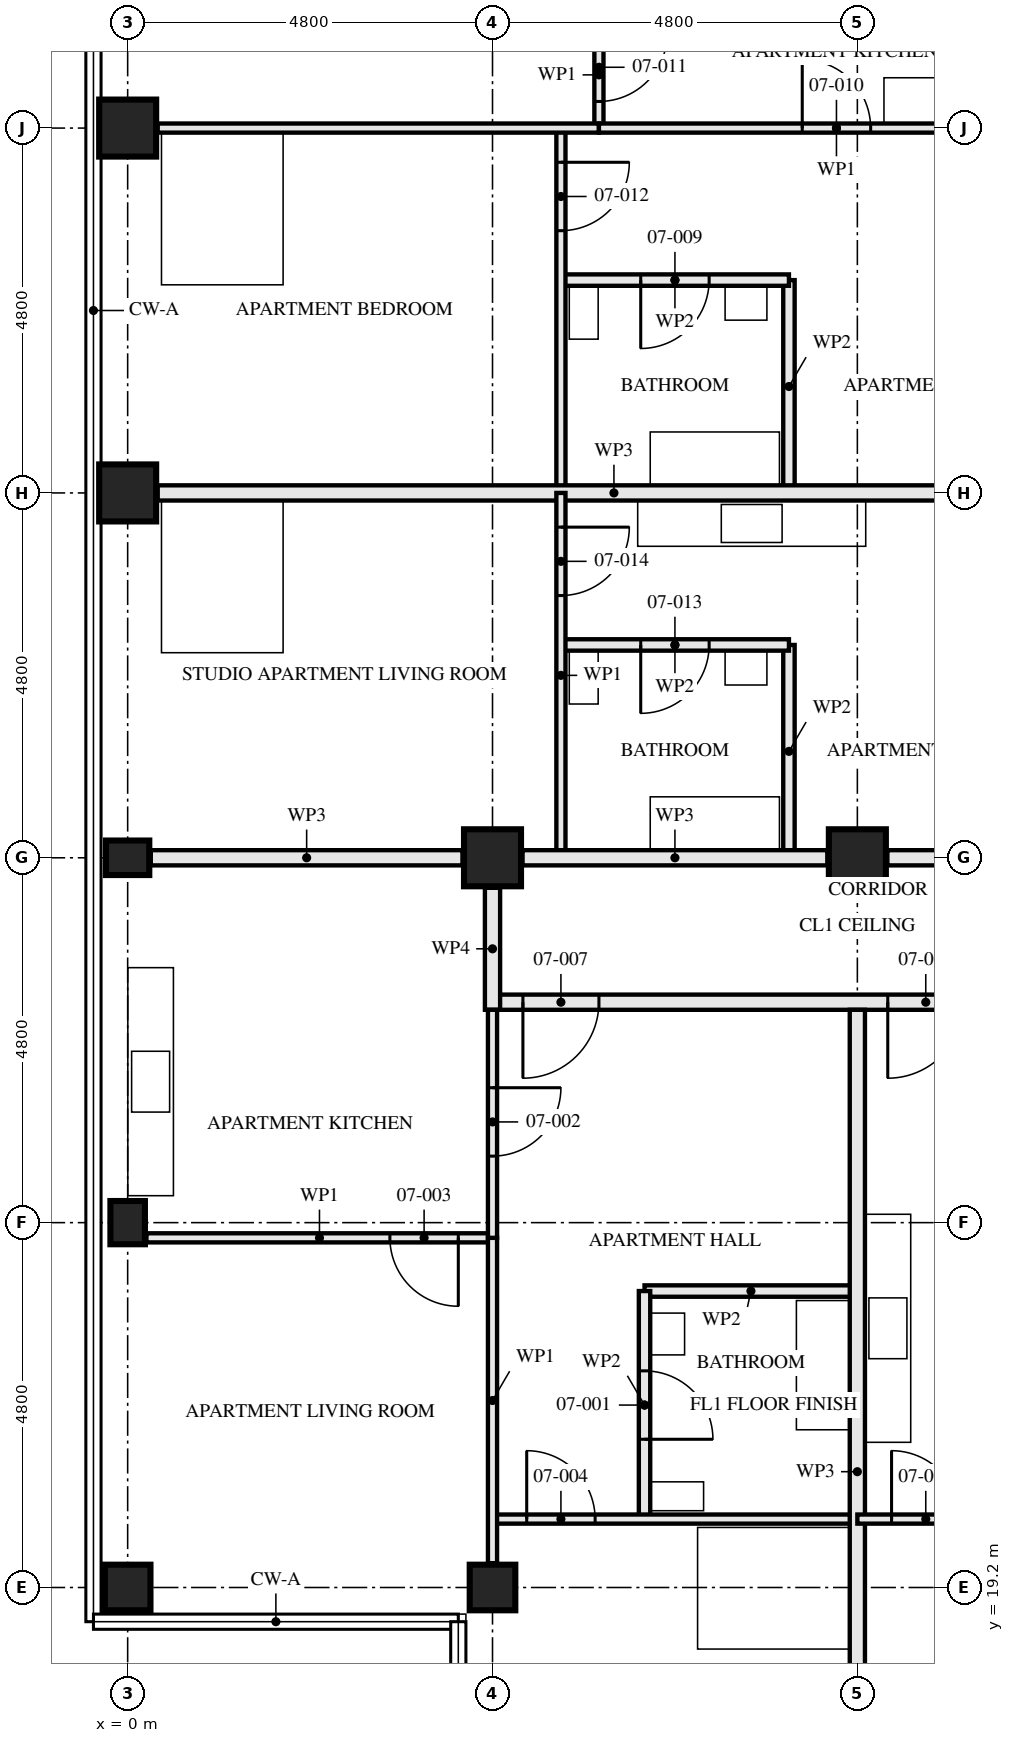
"""IFC4 building model, lengths in metres.
Left out: names, types, materials, properties, quantities, classifications, styles, units other than length and angle.
Written with IfcOpenShell. Run it as: python <this file> out.ifc"""

import sys

from ifc_helpers import new_model, si_unit, direction, frame, frame_2d, origin, origin_2d, place, context, subcontext, project, spatial, rectangle, hollow_rectangle, i_section, extrude, element, fill, save


model = new_model("IFC4")
c1 = context("Model", 3, precision=1e-05, world=origin(), true_north=direction((0.0, 1.0)))
c2 = subcontext(c1, "Body", "Model", "MODEL_VIEW")
j1 = project(units=[si_unit("LENGTHUNIT", "METRE"), si_unit("PLANEANGLEUNIT", "RADIAN")], contexts=[c1])
p1 = place(None, origin())
s1 = spatial("IfcSite", under=j1, at=p1, CompositionType="ELEMENT")
p2 = place(p1, origin())
s2 = spatial("IfcBuilding", under=s1, at=p2, CompositionType="ELEMENT")
p3 = place(p2, frame((0.0, 0.0, 30.5)))
s3 = spatial("IfcBuildingStorey", under=s2, at=p3, CompositionType="ELEMENT", Elevation=30.5)
p4 = place(p3, frame((0.0, 19.2, 0.0), z_axis=(0.0, 0.0, 1.0), x_axis=(0.0, 1.0, 0.0)))
e1 = element("IfcColumn", 1, at=p4, inside=s3, PredefinedType="COLUMN", context=c2, shape_type="SweptSolid", body=[
    extrude(hollow_rectangle(XDim=0.6, YDim=0.6, WallThickness=0.05, at=origin_2d()), origin(), (0.0, 0.0, 1.0), 3.5),
])
for number, where, z_axis, x_axis in (
    (2, (0.0, 24.0, 0.0), (0.0, 0.0, 1.0), (1.0, 0.0, 0.0)),
    (3, (0.0, 28.8, 0.0), (0.0, 0.0, 1.0), (0.0, 1.0, 0.0)),
):
    element("IfcColumn", number, at=place(p3, frame(where, z_axis=z_axis, x_axis=x_axis)), inside=s3, PredefinedType="COLUMN", context=c2, shape_type="SweptSolid", body=[
        extrude(i_section(OverallWidth=0.454, OverallDepth=0.569, WebThickness=0.078, FlangeThickness=0.125, FilletRadius=0.015, at=origin_2d()), origin(), (0.0, 0.0, 1.0), 3.5),
    ])
for number, where, z_axis, x_axis in (
    (4, (0.0, 33.6, 0.0), (0.0, 0.0, 1.0), (1.0, 0.0, 0.0)),
    (5, (0.0, 38.4, 0.0), (0.0, 0.0, 1.0), (1.0, 0.0, 0.0)),
):
    element("IfcColumn", number, at=place(p3, frame(where, z_axis=z_axis, x_axis=x_axis)), inside=s3, PredefinedType="COLUMN", context=c2, shape_type="SweptSolid", body=[
        extrude(hollow_rectangle(XDim=0.75, YDim=0.75, WallThickness=0.08, at=origin_2d()), origin(), (0.0, 0.0, 1.0), 3.5),
    ])
p5 = place(p3, frame((4.8, 19.2, 0.0), z_axis=(0.0, 0.0, 1.0), x_axis=(0.0, 1.0, 0.0)))
e6 = element("IfcColumn", 6, at=p5, inside=s3, PredefinedType="COLUMN", context=c2, shape_type="SweptSolid", body=[
    extrude(hollow_rectangle(XDim=0.6, YDim=0.6, WallThickness=0.05, at=origin_2d()), origin(), (0.0, 0.0, 1.0), 3.5),
])
for number, where, z_axis, x_axis in (
    (7, (4.8, 28.8, 0.0), (0.0, 0.0, 1.0), (0.0, 1.0, 0.0)),
    (8, (9.6, 28.8, 0.0), (0.0, 0.0, 1.0), (0.0, 1.0, 0.0)),
):
    element("IfcColumn", number, at=place(p3, frame(where, z_axis=z_axis, x_axis=x_axis)), inside=s3, PredefinedType="COLUMN", context=c2, shape_type="SweptSolid", body=[
        extrude(hollow_rectangle(XDim=0.75, YDim=0.75, WallThickness=0.08, at=origin_2d()), origin(), (0.0, 0.0, 1.0), 3.5),
    ])
p6 = place(p3, frame((6.8, 20.1, 0.0), z_axis=(0.0, 0.0, 1.0), x_axis=(0.0, 1.0, 0.0)))
e9 = element("IfcWall", 9, at=p6, inside=s3, PredefinedType="PARTITIONING", context=c2, shape_type="SweptSolid", body=[
    extrude(rectangle(XDim=3.0, YDim=0.15, at=frame_2d((1.5, 0.0))), origin(), (0.0, 0.0, 1.0), 3.33),
])
p7 = place(p6, frame((1.05, 0.0, 0.0)))
e10 = element("IfcOpeningElement", 10, at=p7, cuts=e9, PredefinedType="OPENING", context=c2, shape_type="SweptSolid", body=[
    extrude(rectangle(XDim=0.9, YDim=2.1, at=frame_2d((0.45, 1.05))), frame((0.0, 0.085, 0.0), z_axis=(0.0, -1.0, 0.0), x_axis=(1.0, 0.0, 0.0)), (0.0, 0.0, 1.0), 0.171),
])
p8 = place(p3, frame((6.8, 23.1, 0.0), z_axis=(0.0, 0.0, 1.0), x_axis=(1.0, 0.0, 0.0)))
e11 = element("IfcWall", 11, at=p8, inside=s3, PredefinedType="PARTITIONING", context=c2, shape_type="SweptSolid", body=[
    extrude(rectangle(XDim=2.8, YDim=0.15, at=frame_2d((1.4, 0.0))), origin(), (0.0, 0.0, 1.0), 3.33),
])
p9 = place(p3, frame((4.8, 23.8, 0.0), z_axis=(0.0, 0.0, 1.0), x_axis=(0.0, 1.0, 0.0)))
e12 = element("IfcWall", 12, at=p9, inside=s3, PredefinedType="PARTITIONING", context=c2, shape_type="SweptSolid", body=[
    extrude(rectangle(XDim=3.0, YDim=0.12, at=frame_2d((1.5, 0.0))), origin(), (0.0, 0.0, 1.0), 2.55),
])
p10 = place(p9, frame((1.075, 0.0, 0.0)))
e13 = element("IfcOpeningElement", 13, at=p10, cuts=e12, PredefinedType="OPENING", context=c2, shape_type="SweptSolid", body=[
    extrude(rectangle(XDim=0.9, YDim=2.1, at=frame_2d((0.45, 1.05))), frame((0.0, 0.071, 0.0), z_axis=(0.0, -1.0, 0.0), x_axis=(1.0, 0.0, 0.0)), (0.0, 0.0, 1.0), 0.141),
])
p11 = place(p3, frame((0.247, 23.8, 0.0), z_axis=(0.0, 0.0, 1.0), x_axis=(1.0, 0.0, 0.0)))
e14 = element("IfcWall", 14, at=p11, inside=s3, PredefinedType="PARTITIONING", context=c2, shape_type="SweptSolid", body=[
    extrude(rectangle(XDim=4.553, YDim=0.12, at=frame_2d((2.276, 0.0))), origin(), (0.0, 0.0, 1.0), 3.33),
])
p12 = place(p11, frame((3.203, 0.0, 0.0)))
e15 = element("IfcOpeningElement", 15, at=p12, cuts=e14, PredefinedType="OPENING", context=c2, shape_type="SweptSolid", body=[
    extrude(rectangle(XDim=0.9, YDim=2.1, at=frame_2d((0.45, 1.05))), frame((0.0, 0.071, 0.0), z_axis=(0.0, -1.0, 0.0), x_axis=(1.0, 0.0, 0.0)), (0.0, 0.0, 1.0), 0.141),
])
p13 = place(p3, frame((4.8, 20.1, 0.0), z_axis=(0.0, 0.0, 1.0), x_axis=(1.0, 0.0, 0.0)))
e16 = element("IfcWall", 16, at=p13, inside=s3, PredefinedType="PARTITIONING", context=c2, shape_type="SweptSolid", body=[
    extrude(rectangle(XDim=4.8, YDim=0.12, at=frame_2d((2.4, 0.0))), origin(), (0.0, 0.0, 1.0), 3.33),
])
p14 = place(p13, frame((0.45, 0.0, 0.0)))
e17 = element("IfcOpeningElement", 17, at=p14, cuts=e16, PredefinedType="OPENING", context=c2, shape_type="SweptSolid", body=[
    extrude(rectangle(XDim=0.9, YDim=2.1, at=frame_2d((0.45, 1.05))), frame((0.0, 0.071, 0.0), z_axis=(0.0, -1.0, 0.0), x_axis=(1.0, 0.0, 0.0)), (0.0, 0.0, 1.0), 0.141),
])
p15 = place(p3, frame((4.8, 19.52, 0.0), z_axis=(0.0, 0.0, 1.0), x_axis=(0.0, 1.0, 0.0)))
e18 = element("IfcWall", 18, at=p15, inside=s3, PredefinedType="PARTITIONING", context=c2, shape_type="SweptSolid", body=[
    extrude(rectangle(XDim=4.28, YDim=0.12, at=frame_2d((2.14, 0.0))), origin(), (0.0, 0.0, 1.0), 3.33),
])
p16 = place(p3, frame((9.6, 14.647, 0.0), z_axis=(0.0, 0.0, 1.0), x_axis=(0.0, 1.0, 0.0)))
e19 = element("IfcWall", 19, at=p16, inside=s3, PredefinedType="PARTITIONING", context=c2, shape_type="SweptSolid", body=[
    extrude(rectangle(XDim=12.153, YDim=0.2, at=frame_2d((6.077, 0.0))), origin(), (0.0, 0.0, 1.0), 2.55),
])
p17 = place(p3, frame((9.6, 20.1, 0.0), z_axis=(0.0, 0.0, 1.0), x_axis=(1.0, 0.0, 0.0)))
e20 = element("IfcWall", 20, at=p17, inside=s3, PredefinedType="PARTITIONING", context=c2, shape_type="SweptSolid", body=[
    extrude(rectangle(XDim=4.8, YDim=0.12, at=frame_2d((2.4, 0.0))), origin(), (0.0, 0.0, 1.0), 3.33),
])
p18 = place(p17, frame((0.45, 0.0, 0.0)))
e21 = element("IfcOpeningElement", 21, at=p18, cuts=e20, PredefinedType="OPENING", context=c2, shape_type="SweptSolid", body=[
    extrude(rectangle(XDim=0.9, YDim=2.1, at=frame_2d((0.45, 1.05))), frame((0.0, 0.071, 0.0), z_axis=(0.0, -1.0, 0.0), x_axis=(1.0, 0.0, 0.0)), (0.0, 0.0, 1.0), 0.141),
])
p19 = place(p3, frame((4.8, 26.9, 0.0), z_axis=(0.0, 0.0, 1.0), x_axis=(1.0, 0.0, 0.0)))
e22 = element("IfcWall", 22, at=p19, inside=s3, PredefinedType="PARTITIONING", context=c2, shape_type="SweptSolid", body=[
    extrude(rectangle(XDim=9.6, YDim=0.2, at=frame_2d((4.8, 0.0))), origin(), (0.0, 0.0, 1.0), 3.33),
])
p20 = place(p19, frame((0.4, 0.0, 0.0)))
e23 = element("IfcOpeningElement", 23, at=p20, cuts=e22, PredefinedType="OPENING", context=c2, shape_type="SweptSolid", body=[
    extrude(rectangle(XDim=1.0, YDim=2.1, at=frame_2d((0.5, 1.05))), frame((0.0, 0.111, 0.0), z_axis=(0.0, -1.0, 0.0), x_axis=(1.0, 0.0, 0.0)), (0.0, 0.0, 1.0), 0.221),
])
p21 = place(p19, frame((5.2, 0.0, 0.0)))
e24 = element("IfcOpeningElement", 24, at=p21, cuts=e22, PredefinedType="OPENING", context=c2, shape_type="SweptSolid", body=[
    extrude(rectangle(XDim=1.0, YDim=2.1, at=frame_2d((0.5, 1.05))), frame((0.0, 0.111, 0.0), z_axis=(0.0, -1.0, 0.0), x_axis=(1.0, 0.0, 0.0)), (0.0, 0.0, 1.0), 0.221),
])
p22 = place(p3, frame((4.8, 26.8, 0.0), z_axis=(0.0, 0.0, 1.0), x_axis=(0.0, 1.0, 0.0)))
e25 = element("IfcWall", 25, at=p22, inside=s3, PredefinedType="PARTITIONING", context=c2, shape_type="SweptSolid", body=[
    extrude(rectangle(XDim=1.605, YDim=0.2, at=frame_2d((0.802, 0.0))), origin(), (0.0, 0.0, 1.0), 3.33),
])
p23 = place(p3, frame((5.7, 36.4, 0.0), z_axis=(0.0, 0.0, 1.0), x_axis=(1.0, 0.0, 0.0)))
e26 = element("IfcWall", 26, at=p23, inside=s3, PredefinedType="PARTITIONING", context=c2, shape_type="SweptSolid", body=[
    extrude(rectangle(XDim=3.0, YDim=0.15, at=frame_2d((1.5, 0.0))), origin(), (0.0, 0.0, 1.0), 3.33),
])
p24 = place(p23, frame((1.05, 0.0, 0.0)))
e27 = element("IfcOpeningElement", 27, at=p24, cuts=e26, PredefinedType="OPENING", context=c2, shape_type="SweptSolid", body=[
    extrude(rectangle(XDim=0.9, YDim=2.1, at=frame_2d((0.45, 1.05))), frame((0.0, 0.085, 0.0), z_axis=(0.0, -1.0, 0.0), x_axis=(1.0, 0.0, 0.0)), (0.0, 0.0, 1.0), 0.171),
])
p25 = place(p3, frame((8.7, 36.4, 0.0), z_axis=(0.0, 0.0, 1.0), x_axis=(0.0, -1.0, 0.0)))
e28 = element("IfcWall", 28, at=p25, inside=s3, PredefinedType="PARTITIONING", context=c2, shape_type="SweptSolid", body=[
    extrude(rectangle(XDim=2.8, YDim=0.15, at=frame_2d((1.4, 0.0))), origin(), (0.0, 0.0, 1.0), 3.33),
])
p26 = place(p3, frame((6.2, 38.4, 0.0), z_axis=(0.0, 0.0, 1.0), x_axis=(1.0, 0.0, 0.0)))
e29 = element("IfcWall", 29, at=p26, inside=s3, PredefinedType="PARTITIONING", context=c2, shape_type="SweptSolid", body=[
    extrude(rectangle(XDim=6.25, YDim=0.12, at=frame_2d((3.125, 0.0))), origin(), (0.0, 0.0, 1.0), 2.55),
])
p27 = place(p26, frame((2.675, 0.0, 0.0)))
e30 = element("IfcOpeningElement", 30, at=p27, cuts=e29, PredefinedType="OPENING", context=c2, shape_type="SweptSolid", body=[
    extrude(rectangle(XDim=0.9, YDim=2.1, at=frame_2d((0.45, 1.05))), frame((0.0, 0.071, 0.0), z_axis=(0.0, -1.0, 0.0), x_axis=(1.0, 0.0, 0.0)), (0.0, 0.0, 1.0), 0.141),
])
p28 = place(p3, frame((6.2, 39.8, 0.0), z_axis=(0.0, 0.0, 1.0), x_axis=(0.0, -1.0, 0.0)))
e31 = element("IfcWall", 31, at=p28, inside=s3, PredefinedType="PARTITIONING", context=c2, shape_type="SweptSolid", body=[
    extrude(rectangle(XDim=1.4, YDim=0.12, at=frame_2d((0.7, 0.0))), origin(), (0.0, 0.0, 1.0), 3.33),
])
p29 = place(p28, frame((0.15, 0.0, 0.0)))
e32 = element("IfcOpeningElement", 32, at=p29, cuts=e31, PredefinedType="OPENING", context=c2, shape_type="SweptSolid", body=[
    extrude(rectangle(XDim=0.9, YDim=2.1, at=frame_2d((0.45, 1.05))), frame((0.0, 0.071, 0.0), z_axis=(0.0, -1.0, 0.0), x_axis=(1.0, 0.0, 0.0)), (0.0, 0.0, 1.0), 0.141),
])
p30 = place(p3, frame((5.7, 38.4, 0.0), z_axis=(0.0, 0.0, 1.0), x_axis=(0.0, -1.0, 0.0)))
e33 = element("IfcWall", 33, at=p30, inside=s3, PredefinedType="PARTITIONING", context=c2, shape_type="SweptSolid", body=[
    extrude(rectangle(XDim=4.8, YDim=0.12, at=frame_2d((2.4, 0.0))), origin(), (0.0, 0.0, 1.0), 3.33),
])
p31 = place(p30, frame((0.45, 0.0, 0.0)))
e34 = element("IfcOpeningElement", 34, at=p31, cuts=e33, PredefinedType="OPENING", context=c2, shape_type="SweptSolid", body=[
    extrude(rectangle(XDim=0.9, YDim=2.1, at=frame_2d((0.45, 1.05))), frame((0.0, 0.071, 0.0), z_axis=(0.0, -1.0, 0.0), x_axis=(1.0, 0.0, 0.0)), (0.0, 0.0, 1.0), 0.141),
])
p32 = place(p3, frame((0.395, 38.4, 0.0), z_axis=(0.0, 0.0, 1.0), x_axis=(1.0, 0.0, 0.0)))
e35 = element("IfcWall", 35, at=p32, inside=s3, PredefinedType="PARTITIONING", context=c2, shape_type="SweptSolid", body=[
    extrude(rectangle(XDim=5.805, YDim=0.12, at=frame_2d((2.902, 0.0))), origin(), (0.0, 0.0, 1.0), 2.55),
])
p33 = place(p3, frame((0.395, 33.6, 0.0), z_axis=(0.0, 0.0, 1.0), x_axis=(1.0, 0.0, 0.0)))
e36 = element("IfcWall", 36, at=p33, inside=s3, PredefinedType="PARTITIONING", context=c2, shape_type="SweptSolid", body=[
    extrude(rectangle(XDim=12.005, YDim=0.2, at=frame_2d((6.002, 0.0))), origin(), (0.0, 0.0, 1.0), 2.55),
])
p34 = place(p3, frame((5.7, 31.6, 0.0), z_axis=(0.0, 0.0, 1.0), x_axis=(1.0, 0.0, 0.0)))
e37 = element("IfcWall", 37, at=p34, inside=s3, PredefinedType="PARTITIONING", context=c2, shape_type="SweptSolid", body=[
    extrude(rectangle(XDim=3.0, YDim=0.15, at=frame_2d((1.5, 0.0))), origin(), (0.0, 0.0, 1.0), 3.33),
])
p35 = place(p34, frame((1.05, 0.0, 0.0)))
e38 = element("IfcOpeningElement", 38, at=p35, cuts=e37, PredefinedType="OPENING", context=c2, shape_type="SweptSolid", body=[
    extrude(rectangle(XDim=0.9, YDim=2.1, at=frame_2d((0.45, 1.05))), frame((0.0, 0.085, 0.0), z_axis=(0.0, -1.0, 0.0), x_axis=(1.0, 0.0, 0.0)), (0.0, 0.0, 1.0), 0.171),
])
p36 = place(p3, frame((8.7, 31.6, 0.0), z_axis=(0.0, 0.0, 1.0), x_axis=(0.0, -1.0, 0.0)))
e39 = element("IfcWall", 39, at=p36, inside=s3, PredefinedType="PARTITIONING", context=c2, shape_type="SweptSolid", body=[
    extrude(rectangle(XDim=2.8, YDim=0.15, at=frame_2d((1.4, 0.0))), origin(), (0.0, 0.0, 1.0), 3.33),
])
p37 = place(p3, frame((5.7, 33.6, 0.0), z_axis=(0.0, 0.0, 1.0), x_axis=(0.0, -1.0, 0.0)))
e40 = element("IfcWall", 40, at=p37, inside=s3, PredefinedType="PARTITIONING", context=c2, shape_type="SweptSolid", body=[
    extrude(rectangle(XDim=4.8, YDim=0.12, at=frame_2d((2.4, 0.0))), origin(), (0.0, 0.0, 1.0), 3.33),
])
p38 = place(p37, frame((0.45, 0.0, 0.0)))
e41 = element("IfcOpeningElement", 41, at=p38, cuts=e40, PredefinedType="OPENING", context=c2, shape_type="SweptSolid", body=[
    extrude(rectangle(XDim=0.9, YDim=2.1, at=frame_2d((0.45, 1.05))), frame((0.0, 0.071, 0.0), z_axis=(0.0, -1.0, 0.0), x_axis=(1.0, 0.0, 0.0)), (0.0, 0.0, 1.0), 0.141),
])
p39 = place(p3, frame((12.5, 28.8, 0.0), z_axis=(0.0, 0.0, 1.0), x_axis=(-1.0, 0.0, 0.0)))
e42 = element("IfcWall", 42, at=p39, inside=s3, PredefinedType="PARTITIONING", context=c2, shape_type="SweptSolid", body=[
    extrude(rectangle(XDim=2.505, YDim=0.2, at=frame_2d((1.252, 0.0))), origin(), (0.0, 0.0, 1.0), 2.32),
])
p40 = place(p3, frame((9.205, 28.8, 0.0), z_axis=(0.0, 0.0, 1.0), x_axis=(-1.0, 0.0, 0.0)))
e43 = element("IfcWall", 43, at=p40, inside=s3, PredefinedType="PARTITIONING", context=c2, shape_type="SweptSolid", body=[
    extrude(rectangle(XDim=4.01, YDim=0.2, at=frame_2d((2.005, 0.0))), origin(), (0.0, 0.0, 1.0), 2.32),
])
p41 = place(p3, frame((4.405, 28.8, 0.0), z_axis=(0.0, 0.0, 1.0), x_axis=(-1.0, 0.0, 0.0)))
e44 = element("IfcWall", 44, at=p41, inside=s3, PredefinedType="PARTITIONING", context=c2, shape_type="SweptSolid", body=[
    extrude(rectangle(XDim=4.101, YDim=0.2, at=frame_2d((2.05, 0.0))), origin(), (0.0, 0.0, 1.0), 2.32),
])
p42 = place(p7, frame((0.9, 0.0, 0.0), z_axis=(0.0, 0.0, 1.0), x_axis=(-1.0, 0.0, 0.0)))
e45 = element("IfcDoor", 45, at=p42, inside=s3, OperationType="SINGLE_SWING_LEFT", PredefinedType="DOOR", context=c2, shape_type="SweptSolid", body=[
    extrude(rectangle(XDim=0.9, YDim=2.1, at=frame_2d((0.45, 1.05))), frame((0.0, 0.022, 0.0), z_axis=(0.0, -1.0, 0.0), x_axis=(1.0, 0.0, 0.0)), (0.0, 0.0, 1.0), 0.044),
])
fill(e10, e45)
p43 = place(p10, frame((0.9, 0.0, 0.0), z_axis=(0.0, 0.0, 1.0), x_axis=(-1.0, 0.0, 0.0)))
e46 = element("IfcDoor", 46, at=p43, inside=s3, OperationType="SINGLE_SWING_RIGHT", PredefinedType="DOOR", context=c2, shape_type="SweptSolid", body=[
    extrude(rectangle(XDim=0.9, YDim=2.1, at=frame_2d((0.45, 1.05))), frame((0.0, 0.022, 0.0), z_axis=(0.0, -1.0, 0.0), x_axis=(1.0, 0.0, 0.0)), (0.0, 0.0, 1.0), 0.044),
])
fill(e13, e46)
p44 = place(p12, frame((0.9, 0.0, 0.0), z_axis=(0.0, 0.0, 1.0), x_axis=(-1.0, 0.0, 0.0)))
e47 = element("IfcDoor", 47, at=p44, inside=s3, OperationType="SINGLE_SWING_RIGHT", PredefinedType="DOOR", context=c2, shape_type="SweptSolid", body=[
    extrude(rectangle(XDim=0.9, YDim=2.1, at=frame_2d((0.45, 1.05))), frame((0.0, 0.022, 0.0), z_axis=(0.0, -1.0, 0.0), x_axis=(1.0, 0.0, 0.0)), (0.0, 0.0, 1.0), 0.044),
])
fill(e15, e47)
p45 = place(p14, origin())
e48 = element("IfcDoor", 48, at=p45, inside=s3, OperationType="SINGLE_SWING_RIGHT", PredefinedType="DOOR", context=c2, shape_type="SweptSolid", body=[
    extrude(rectangle(XDim=0.9, YDim=2.1, at=frame_2d((0.45, 1.05))), frame((0.0, 0.022, 0.0), z_axis=(0.0, -1.0, 0.0), x_axis=(1.0, 0.0, 0.0)), (0.0, 0.0, 1.0), 0.044),
])
fill(e17, e48)
p46 = place(p18, origin())
e49 = element("IfcDoor", 49, at=p46, inside=s3, OperationType="SINGLE_SWING_RIGHT", PredefinedType="DOOR", context=c2, shape_type="SweptSolid", body=[
    extrude(rectangle(XDim=0.9, YDim=2.1, at=frame_2d((0.45, 1.05))), frame((0.0, 0.022, 0.0), z_axis=(0.0, -1.0, 0.0), x_axis=(1.0, 0.0, 0.0)), (0.0, 0.0, 1.0), 0.044),
])
fill(e21, e49)
p47 = place(p20, frame((1.0, 0.0, 0.0), z_axis=(0.0, 0.0, 1.0), x_axis=(-1.0, 0.0, 0.0)))
e50 = element("IfcDoor", 50, at=p47, inside=s3, OperationType="SINGLE_SWING_LEFT", PredefinedType="DOOR", context=c2, shape_type="SweptSolid", body=[
    extrude(rectangle(XDim=1.0, YDim=2.1, at=frame_2d((0.5, 1.05))), frame((0.0, 0.027, 0.0), z_axis=(0.0, -1.0, 0.0), x_axis=(1.0, 0.0, 0.0)), (0.0, 0.0, 1.0), 0.054),
])
fill(e23, e50)
p48 = place(p21, frame((1.0, 0.0, 0.0), z_axis=(0.0, 0.0, 1.0), x_axis=(-1.0, 0.0, 0.0)))
e51 = element("IfcDoor", 51, at=p48, inside=s3, OperationType="SINGLE_SWING_LEFT", PredefinedType="DOOR", context=c2, shape_type="SweptSolid", body=[
    extrude(rectangle(XDim=1.0, YDim=2.1, at=frame_2d((0.5, 1.05))), frame((0.0, 0.027, 0.0), z_axis=(0.0, -1.0, 0.0), x_axis=(1.0, 0.0, 0.0)), (0.0, 0.0, 1.0), 0.054),
])
fill(e24, e51)
p49 = place(p24, frame((0.9, 0.0, 0.0), z_axis=(0.0, 0.0, 1.0), x_axis=(-1.0, 0.0, 0.0)))
e52 = element("IfcDoor", 52, at=p49, inside=s3, OperationType="SINGLE_SWING_LEFT", PredefinedType="DOOR", context=c2, shape_type="SweptSolid", body=[
    extrude(rectangle(XDim=0.9, YDim=2.1, at=frame_2d((0.45, 1.05))), frame((0.0, 0.022, 0.0), z_axis=(0.0, -1.0, 0.0), x_axis=(1.0, 0.0, 0.0)), (0.0, 0.0, 1.0), 0.044),
])
fill(e27, e52)
p50 = place(p27, origin())
e53 = element("IfcDoor", 53, at=p50, inside=s3, OperationType="SINGLE_SWING_RIGHT", PredefinedType="DOOR", context=c2, shape_type="SweptSolid", body=[
    extrude(rectangle(XDim=0.9, YDim=2.1, at=frame_2d((0.45, 1.05))), frame((0.0, 0.022, 0.0), z_axis=(0.0, -1.0, 0.0), x_axis=(1.0, 0.0, 0.0)), (0.0, 0.0, 1.0), 0.044),
])
fill(e30, e53)
p51 = place(p29, origin())
e54 = element("IfcDoor", 54, at=p51, inside=s3, OperationType="SINGLE_SWING_RIGHT", PredefinedType="DOOR", context=c2, shape_type="SweptSolid", body=[
    extrude(rectangle(XDim=0.9, YDim=2.1, at=frame_2d((0.45, 1.05))), frame((0.0, 0.022, 0.0), z_axis=(0.0, -1.0, 0.0), x_axis=(1.0, 0.0, 0.0)), (0.0, 0.0, 1.0), 0.044),
])
fill(e32, e54)
p52 = place(p31, origin())
e55 = element("IfcDoor", 55, at=p52, inside=s3, OperationType="SINGLE_SWING_RIGHT", PredefinedType="DOOR", context=c2, shape_type="SweptSolid", body=[
    extrude(rectangle(XDim=0.9, YDim=2.1, at=frame_2d((0.45, 1.05))), frame((0.0, 0.022, 0.0), z_axis=(0.0, -1.0, 0.0), x_axis=(1.0, 0.0, 0.0)), (0.0, 0.0, 1.0), 0.044),
])
fill(e34, e55)
p53 = place(p35, frame((0.9, 0.0, 0.0), z_axis=(0.0, 0.0, 1.0), x_axis=(-1.0, 0.0, 0.0)))
e56 = element("IfcDoor", 56, at=p53, inside=s3, OperationType="SINGLE_SWING_LEFT", PredefinedType="DOOR", context=c2, shape_type="SweptSolid", body=[
    extrude(rectangle(XDim=0.9, YDim=2.1, at=frame_2d((0.45, 1.05))), frame((0.0, 0.022, 0.0), z_axis=(0.0, -1.0, 0.0), x_axis=(1.0, 0.0, 0.0)), (0.0, 0.0, 1.0), 0.044),
])
fill(e38, e56)
p54 = place(p38, origin())
e57 = element("IfcDoor", 57, at=p54, inside=s3, OperationType="SINGLE_SWING_RIGHT", PredefinedType="DOOR", context=c2, shape_type="SweptSolid", body=[
    extrude(rectangle(XDim=0.9, YDim=2.1, at=frame_2d((0.45, 1.05))), frame((0.0, 0.022, 0.0), z_axis=(0.0, -1.0, 0.0), x_axis=(1.0, 0.0, 0.0)), (0.0, 0.0, 1.0), 0.044),
])
fill(e41, e57)
save(model, sys.argv[1])
